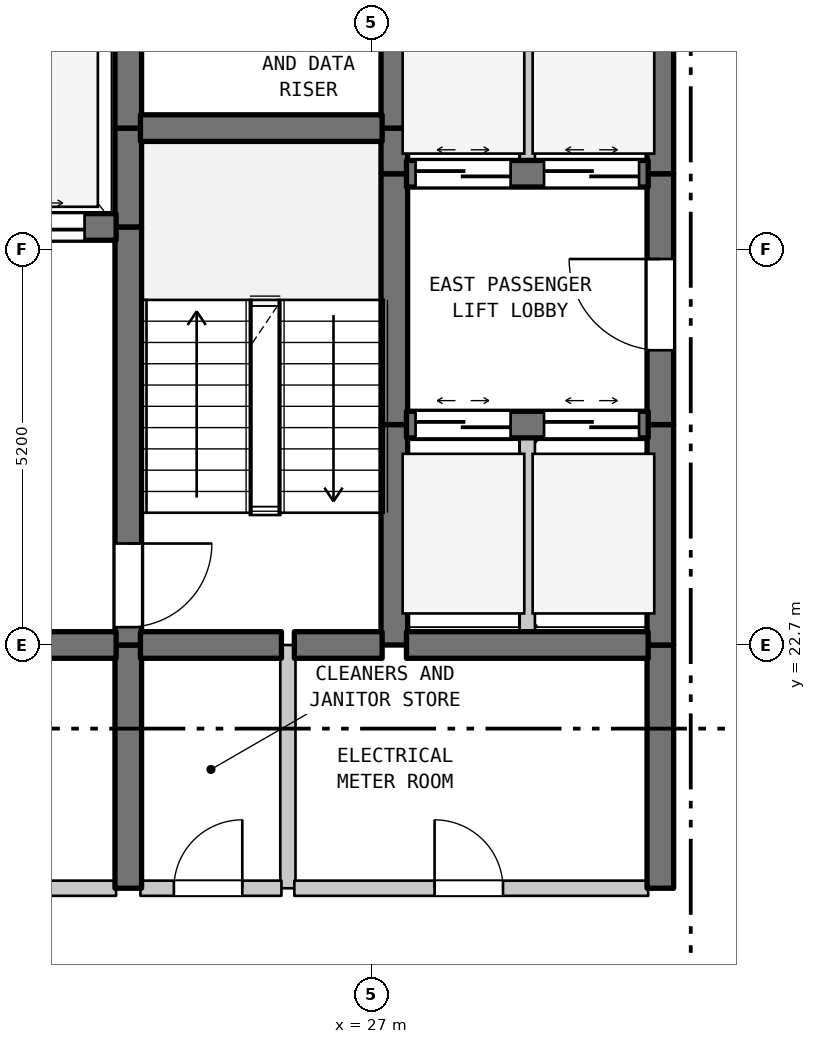
"""IFC4 building model, lengths in metres.
Left out: names, types, materials, properties, quantities, classifications, styles, units other than length and angle.
Written with IfcOpenShell. Run it as: python <this file> out.ifc"""

import sys

from ifc_helpers import new_model, si_unit, direction, frame, frame_2d, origin, place, context, subcontext, project, spatial, rectangle, extrude, element, fill, save


model = new_model("IFC4")
c1 = context("Model", 3, precision=1e-05, world=origin(), true_north=direction((0.0, 1.0)))
c2 = subcontext(c1, "Body", "Model", "MODEL_VIEW")
j1 = project(units=[si_unit("LENGTHUNIT", "METRE"), si_unit("PLANEANGLEUNIT", "RADIAN")], contexts=[c1])
p1 = place(None, origin())
s1 = spatial("IfcSite", under=j1, at=p1, CompositionType="ELEMENT")
p2 = place(p1, origin())
s2 = spatial("IfcBuilding", under=s1, at=p2, CompositionType="ELEMENT")
p3 = place(p2, frame((0.0, 0.0, 188.4)))
s3 = spatial("IfcBuildingStorey", under=s2, at=p3, CompositionType="ELEMENT", Elevation=188.4)
p4 = place(p3, frame((23.8, 19.5, 0.0), z_axis=(0.0, 0.0, 1.0), x_axis=(0.0, 1.0, 0.0)))
e1 = element("IfcWall", 1, at=p4, inside=s3, PredefinedType="SHEAR", context=c2, shape_type="SweptSolid", body=[
    extrude(rectangle(XDim=3.2, YDim=0.35, at=frame_2d((1.6, 0.0))), origin(), (0.0, 0.0, 1.0), 3.39),
])
p5 = place(p3, frame((23.8, 22.7, 0.0), z_axis=(0.0, 0.0, 1.0), x_axis=(0.0, 1.0, 0.0)))
e2 = element("IfcWall", 2, at=p5, inside=s3, PredefinedType="SHEAR", context=c2, shape_type="SweptSolid", body=[
    extrude(rectangle(XDim=5.5, YDim=0.35, at=frame_2d((2.75, 0.0))), origin(), (0.0, 0.0, 1.0), 3.39),
])
p6 = place(p5, frame((0.235, 0.0, 0.0)))
e3 = element("IfcOpeningElement", 3, at=p6, cuts=e2, PredefinedType="OPENING", context=c2, shape_type="SweptSolid", body=[
    extrude(rectangle(XDim=1.1, YDim=2.15, at=frame_2d((0.55, 1.075))), frame((0.0, 0.185, 0.0), z_axis=(0.0, -1.0, 0.0), x_axis=(1.0, 0.0, 0.0)), (0.0, 0.0, 1.0), 0.37),
])
for number, where, z_axis, x_axis in (
    (4, (23.8, 28.2, 0.0), (0.0, 0.0, 1.0), (0.0, 1.0, 0.0)),
    (5, (23.8, 29.5, 0.0), (0.0, 0.0, 1.0), (0.0, 1.0, 0.0)),
):
    element("IfcWall", number, at=place(p3, frame(where, z_axis=z_axis, x_axis=x_axis)), inside=s3, PredefinedType="SHEAR", context=c2, shape_type="SweptSolid", body=[
        extrude(rectangle(XDim=1.3, YDim=0.35, at=frame_2d((0.65, 0.0))), origin(), (0.0, 0.0, 1.0), 3.39),
    ])
p7 = place(p3, frame((25.9, 19.5, 0.0), z_axis=(0.0, 0.0, 1.0), x_axis=(0.0, 1.0, 0.0)))
e6 = element("IfcWall", 6, at=p7, inside=s3, PredefinedType="STANDARD", context=c2, shape_type="SweptSolid", body=[
    extrude(rectangle(XDim=3.2, YDim=0.2, at=frame_2d((1.6, 0.0))), origin(), (0.0, 0.0, 1.0), 3.39),
])
p8 = place(p3, frame((27.3, 22.7, 0.0), z_axis=(0.0, 0.0, 1.0), x_axis=(0.0, 1.0, 0.0)))
e7 = element("IfcWall", 7, at=p8, inside=s3, PredefinedType="SHEAR", context=c2, shape_type="SweptSolid", body=[
    extrude(rectangle(XDim=2.9, YDim=0.35, at=frame_2d((1.45, 0.0))), origin(), (0.0, 0.0, 1.0), 3.39),
])
p9 = place(p3, frame((27.3, 25.6, 0.0), z_axis=(0.0, 0.0, 1.0), x_axis=(0.0, 1.0, 0.0)))
e8 = element("IfcWall", 8, at=p9, inside=s3, PredefinedType="SHEAR", context=c2, shape_type="SweptSolid", body=[
    extrude(rectangle(XDim=3.3, YDim=0.35, at=frame_2d((1.65, 0.0))), origin(), (0.0, 0.0, 1.0), 3.39),
])
p10 = place(p3, frame((27.3, 28.9, 0.0), z_axis=(0.0, 0.0, 1.0), x_axis=(0.0, 1.0, 0.0)))
e9 = element("IfcWall", 9, at=p10, inside=s3, PredefinedType="SHEAR", context=c2, shape_type="SweptSolid", body=[
    extrude(rectangle(XDim=0.6, YDim=0.35, at=frame_2d((0.3, 0.0))), origin(), (0.0, 0.0, 1.0), 3.39),
])
p11 = place(p3, frame((27.3, 29.5, 0.0), z_axis=(0.0, 0.0, 1.0), x_axis=(0.0, 1.0, 0.0)))
e10 = element("IfcWall", 10, at=p11, inside=s3, PredefinedType="SHEAR", context=c2, shape_type="SweptSolid", body=[
    extrude(rectangle(XDim=2.0, YDim=0.35, at=frame_2d((1.0, 0.0))), origin(), (0.0, 0.0, 1.0), 3.39),
])
p12 = place(p3, frame((29.05, 22.7, 0.0), z_axis=(0.0, 0.0, 1.0), x_axis=(0.0, 1.0, 0.0)))
e11 = element("IfcWall", 11, at=p12, inside=s3, PredefinedType="STANDARD", context=c2, shape_type="SweptSolid", body=[
    extrude(rectangle(XDim=2.9, YDim=0.2, at=frame_2d((1.45, 0.0))), origin(), (0.0, 0.0, 1.0), 3.39),
])
p13 = place(p3, frame((29.05, 28.9, 0.0), z_axis=(0.0, 0.0, 1.0), x_axis=(0.0, 1.0, 0.0)))
e12 = element("IfcWall", 12, at=p13, inside=s3, PredefinedType="STANDARD", context=c2, shape_type="SweptSolid", body=[
    extrude(rectangle(XDim=2.6, YDim=0.2, at=frame_2d((1.3, 0.0))), origin(), (0.0, 0.0, 1.0), 3.39),
])
p14 = place(p3, frame((30.8, 19.5, 0.0), z_axis=(0.0, 0.0, 1.0), x_axis=(0.0, 1.0, 0.0)))
e13 = element("IfcWall", 13, at=p14, inside=s3, PredefinedType="SHEAR", context=c2, shape_type="SweptSolid", body=[
    extrude(rectangle(XDim=3.2, YDim=0.35, at=frame_2d((1.6, 0.0))), origin(), (0.0, 0.0, 1.0), 3.39),
])
p15 = place(p3, frame((30.8, 22.7, 0.0), z_axis=(0.0, 0.0, 1.0), x_axis=(0.0, 1.0, 0.0)))
e14 = element("IfcWall", 14, at=p15, inside=s3, PredefinedType="SHEAR", context=c2, shape_type="SweptSolid", body=[
    extrude(rectangle(XDim=2.9, YDim=0.35, at=frame_2d((1.45, 0.0))), origin(), (0.0, 0.0, 1.0), 3.39),
])
p16 = place(p3, frame((30.8, 25.6, 0.0), z_axis=(0.0, 0.0, 1.0), x_axis=(0.0, 1.0, 0.0)))
e15 = element("IfcWall", 15, at=p16, inside=s3, PredefinedType="SHEAR", context=c2, shape_type="SweptSolid", body=[
    extrude(rectangle(XDim=3.3, YDim=0.35, at=frame_2d((1.65, 0.0))), origin(), (0.0, 0.0, 1.0), 3.39),
])
p17 = place(p16, frame((0.978, 0.0, 0.0)))
e16 = element("IfcOpeningElement", 16, at=p17, cuts=e15, PredefinedType="OPENING", context=c2, shape_type="SweptSolid", body=[
    extrude(rectangle(XDim=1.2, YDim=2.2, at=frame_2d((0.6, 1.1))), frame((0.0, 0.185, 0.0), z_axis=(0.0, -1.0, 0.0), x_axis=(1.0, 0.0, 0.0)), (0.0, 0.0, 1.0), 0.37),
])
p18 = place(p3, frame((30.8, 28.9, 0.0), z_axis=(0.0, 0.0, 1.0), x_axis=(0.0, 1.0, 0.0)))
e17 = element("IfcWall", 17, at=p18, inside=s3, PredefinedType="SHEAR", context=c2, shape_type="SweptSolid", body=[
    extrude(rectangle(XDim=2.6, YDim=0.35, at=frame_2d((1.3, 0.0))), origin(), (0.0, 0.0, 1.0), 3.39),
])
p19 = place(p3, frame((19.16, 19.5, 0.0), z_axis=(0.0, 0.0, 1.0), x_axis=(1.0, 0.0, 0.0)))
e18 = element("IfcWall", 18, at=p19, inside=s3, PredefinedType="STANDARD", context=c2, shape_type="SweptSolid", body=[
    extrude(rectangle(XDim=4.48, YDim=0.2, at=frame_2d((2.24, 0.0))), origin(), (0.0, 0.0, 1.0), 3.39),
])
p20 = place(p19, frame((1.64, 0.0, 0.0)))
e19 = element("IfcOpeningElement", 19, at=p20, cuts=e18, PredefinedType="OPENING", context=c2, shape_type="SweptSolid", body=[
    extrude(rectangle(XDim=1.2, YDim=2.2, at=frame_2d((0.6, 1.1))), frame((0.0, 0.11, 0.0), z_axis=(0.0, -1.0, 0.0), x_axis=(1.0, 0.0, 0.0)), (0.0, 0.0, 1.0), 0.22),
])
p21 = place(p3, frame((23.96, 19.5, 0.0), z_axis=(0.0, 0.0, 1.0), x_axis=(1.0, 0.0, 0.0)))
e20 = element("IfcWall", 20, at=p21, inside=s3, PredefinedType="STANDARD", context=c2, shape_type="SweptSolid", body=[
    extrude(rectangle(XDim=1.855, YDim=0.2, at=frame_2d((0.927, 0.0))), origin(), (0.0, 0.0, 1.0), 3.39),
])
p22 = place(p21, frame((0.44, 0.0, 0.0)))
e21 = element("IfcOpeningElement", 21, at=p22, cuts=e20, PredefinedType="OPENING", context=c2, shape_type="SweptSolid", body=[
    extrude(rectangle(XDim=0.9, YDim=2.15, at=frame_2d((0.45, 1.075))), frame((0.0, 0.11, 0.0), z_axis=(0.0, -1.0, 0.0), x_axis=(1.0, 0.0, 0.0)), (0.0, 0.0, 1.0), 0.22),
])
p23 = place(p3, frame((25.985, 19.5, 0.0), z_axis=(0.0, 0.0, 1.0), x_axis=(1.0, 0.0, 0.0)))
e22 = element("IfcWall", 22, at=p23, inside=s3, PredefinedType="STANDARD", context=c2, shape_type="SweptSolid", body=[
    extrude(rectangle(XDim=4.655, YDim=0.2, at=frame_2d((2.327, 0.0))), origin(), (0.0, 0.0, 1.0), 3.39),
])
p24 = place(p23, frame((1.845, 0.0, 0.0)))
e23 = element("IfcOpeningElement", 23, at=p24, cuts=e22, PredefinedType="OPENING", context=c2, shape_type="SweptSolid", body=[
    extrude(rectangle(XDim=0.9, YDim=2.15, at=frame_2d((0.45, 1.075))), frame((0.0, 0.11, 0.0), z_axis=(0.0, -1.0, 0.0), x_axis=(1.0, 0.0, 0.0)), (0.0, 0.0, 1.0), 0.22),
])
p25 = place(p3, frame((19.16, 22.7, 0.0), z_axis=(0.0, 0.0, 1.0), x_axis=(1.0, 0.0, 0.0)))
e24 = element("IfcWall", 24, at=p25, inside=s3, PredefinedType="SHEAR", context=c2, shape_type="SweptSolid", body=[
    extrude(rectangle(XDim=4.48, YDim=0.35, at=frame_2d((2.24, 0.0))), origin(), (0.0, 0.0, 1.0), 3.39),
])
p26 = place(p25, frame((1.64, 0.0, 0.0)))
e25 = element("IfcOpeningElement", 25, at=p26, cuts=e24, PredefinedType="OPENING", context=c2, shape_type="SweptSolid", body=[
    extrude(rectangle(XDim=1.2, YDim=2.2, at=frame_2d((0.6, 1.1))), frame((0.0, 0.185, 0.0), z_axis=(0.0, -1.0, 0.0), x_axis=(1.0, 0.0, 0.0)), (0.0, 0.0, 1.0), 0.37),
])
p27 = place(p3, frame((23.96, 22.7, 0.0), z_axis=(0.0, 0.0, 1.0), x_axis=(1.0, 0.0, 0.0)))
e26 = element("IfcWall", 26, at=p27, inside=s3, PredefinedType="SHEAR", context=c2, shape_type="SweptSolid", body=[
    extrude(rectangle(XDim=1.855, YDim=0.35, at=frame_2d((0.927, 0.0))), origin(), (0.0, 0.0, 1.0), 3.39),
])
p28 = place(p3, frame((25.985, 22.7, 0.0), z_axis=(0.0, 0.0, 1.0), x_axis=(1.0, 0.0, 0.0)))
e27 = element("IfcWall", 27, at=p28, inside=s3, PredefinedType="SHEAR", context=c2, shape_type="SweptSolid", body=[
    extrude(rectangle(XDim=1.155, YDim=0.35, at=frame_2d((0.577, 0.0))), origin(), (0.0, 0.0, 1.0), 3.39),
])
p29 = place(p3, frame((27.46, 22.7, 0.0), z_axis=(0.0, 0.0, 1.0), x_axis=(1.0, 0.0, 0.0)))
e28 = element("IfcWall", 28, at=p29, inside=s3, PredefinedType="SHEAR", context=c2, shape_type="SweptSolid", body=[
    extrude(rectangle(XDim=3.18, YDim=0.35, at=frame_2d((1.59, 0.0))), origin(), (0.0, 0.0, 1.0), 3.39),
])
p30 = place(p3, frame((27.46, 25.6, 0.0), z_axis=(0.0, 0.0, 1.0), x_axis=(1.0, 0.0, 0.0)))
e29 = element("IfcWall", 29, at=p30, inside=s3, PredefinedType="SHEAR", context=c2, shape_type="SweptSolid", body=[
    extrude(rectangle(XDim=3.18, YDim=0.35, at=frame_2d((1.59, 0.0))), origin(), (0.0, 0.0, 1.0), 3.39),
])
p31 = place(p30, frame((0.12, 0.0, 0.0)))
e30 = element("IfcOpeningElement", 30, at=p31, cuts=e29, PredefinedType="OPENING", context=c2, shape_type="SweptSolid", body=[
    extrude(rectangle(XDim=1.25, YDim=2.2, at=frame_2d((0.625, 1.1))), frame((0.0, 0.185, 0.0), z_axis=(0.0, -1.0, 0.0), x_axis=(1.0, 0.0, 0.0)), (0.0, 0.0, 1.0), 0.37),
])
p32 = place(p30, frame((1.81, 0.0, 0.0)))
e31 = element("IfcOpeningElement", 31, at=p32, cuts=e29, PredefinedType="OPENING", context=c2, shape_type="SweptSolid", body=[
    extrude(rectangle(XDim=1.25, YDim=2.2, at=frame_2d((0.625, 1.1))), frame((0.0, 0.185, 0.0), z_axis=(0.0, -1.0, 0.0), x_axis=(1.0, 0.0, 0.0)), (0.0, 0.0, 1.0), 0.37),
])
p33 = place(p3, frame((19.16, 28.2, 0.0), z_axis=(0.0, 0.0, 1.0), x_axis=(1.0, 0.0, 0.0)))
e32 = element("IfcWall", 32, at=p33, inside=s3, PredefinedType="SHEAR", context=c2, shape_type="SweptSolid", body=[
    extrude(rectangle(XDim=4.48, YDim=0.35, at=frame_2d((2.24, 0.0))), origin(), (0.0, 0.0, 1.0), 3.39),
])
p34 = place(p33, frame((0.415, 0.0, 0.0)))
e33 = element("IfcOpeningElement", 33, at=p34, cuts=e32, PredefinedType="OPENING", context=c2, shape_type="SweptSolid", body=[
    extrude(rectangle(XDim=1.25, YDim=2.2, at=frame_2d((0.625, 1.1))), frame((0.0, 0.185, 0.0), z_axis=(0.0, -1.0, 0.0), x_axis=(1.0, 0.0, 0.0)), (0.0, 0.0, 1.0), 0.37),
])
p35 = place(p33, frame((2.815, 0.0, 0.0)))
e34 = element("IfcOpeningElement", 34, at=p35, cuts=e32, PredefinedType="OPENING", context=c2, shape_type="SweptSolid", body=[
    extrude(rectangle(XDim=1.25, YDim=2.2, at=frame_2d((0.625, 1.1))), frame((0.0, 0.185, 0.0), z_axis=(0.0, -1.0, 0.0), x_axis=(1.0, 0.0, 0.0)), (0.0, 0.0, 1.0), 0.37),
])
p36 = place(p3, frame((27.46, 28.9, 0.0), z_axis=(0.0, 0.0, 1.0), x_axis=(1.0, 0.0, 0.0)))
e35 = element("IfcWall", 35, at=p36, inside=s3, PredefinedType="SHEAR", context=c2, shape_type="SweptSolid", body=[
    extrude(rectangle(XDim=3.18, YDim=0.35, at=frame_2d((1.59, 0.0))), origin(), (0.0, 0.0, 1.0), 3.39),
])
p37 = place(p36, frame((0.12, 0.0, 0.0)))
e36 = element("IfcOpeningElement", 36, at=p37, cuts=e35, PredefinedType="OPENING", context=c2, shape_type="SweptSolid", body=[
    extrude(rectangle(XDim=1.25, YDim=2.2, at=frame_2d((0.625, 1.1))), frame((0.0, 0.185, 0.0), z_axis=(0.0, -1.0, 0.0), x_axis=(1.0, 0.0, 0.0)), (0.0, 0.0, 1.0), 0.37),
])
p38 = place(p36, frame((1.81, 0.0, 0.0)))
e37 = element("IfcOpeningElement", 37, at=p38, cuts=e35, PredefinedType="OPENING", context=c2, shape_type="SweptSolid", body=[
    extrude(rectangle(XDim=1.25, YDim=2.2, at=frame_2d((0.625, 1.1))), frame((0.0, 0.185, 0.0), z_axis=(0.0, -1.0, 0.0), x_axis=(1.0, 0.0, 0.0)), (0.0, 0.0, 1.0), 0.37),
])
p39 = place(p3, frame((23.96, 29.5, 0.0), z_axis=(0.0, 0.0, 1.0), x_axis=(1.0, 0.0, 0.0)))
e38 = element("IfcWall", 38, at=p39, inside=s3, PredefinedType="SHEAR", context=c2, shape_type="SweptSolid", body=[
    extrude(rectangle(XDim=3.18, YDim=0.35, at=frame_2d((1.59, 0.0))), origin(), (0.0, 0.0, 1.0), 3.39),
])
p40 = place(p6, frame((1.1, 0.0, 0.0), z_axis=(0.0, 0.0, 1.0), x_axis=(-1.0, 0.0, 0.0)))
e39 = element("IfcDoor", 39, at=p40, inside=s3, OperationType="SINGLE_SWING_RIGHT", PredefinedType="DOOR", context=c2, shape_type="SweptSolid", body=[
    extrude(rectangle(XDim=1.1, YDim=2.15, at=frame_2d((0.55, 1.075))), frame((0.0, 0.025, 0.0), z_axis=(0.0, -1.0, 0.0), x_axis=(1.0, 0.0, 0.0)), (0.0, 0.0, 1.0), 0.05),
])
fill(e3, e39)
p41 = place(p17, origin())
e40 = element("IfcDoor", 40, at=p41, inside=s3, OperationType="SINGLE_SWING_RIGHT", PredefinedType="DOOR", context=c2, shape_type="SweptSolid", body=[
    extrude(rectangle(XDim=1.2, YDim=2.2, at=frame_2d((0.6, 1.1))), frame((0.0, 0.025, 0.0), z_axis=(0.0, -1.0, 0.0), x_axis=(1.0, 0.0, 0.0)), (0.0, 0.0, 1.0), 0.05),
])
fill(e16, e40)
p42 = place(p22, origin())
e41 = element("IfcDoor", 41, at=p42, inside=s3, OperationType="SINGLE_SWING_RIGHT", PredefinedType="DOOR", context=c2, shape_type="SweptSolid", body=[
    extrude(rectangle(XDim=0.9, YDim=2.15, at=frame_2d((0.45, 1.075))), frame((0.0, 0.025, 0.0), z_axis=(0.0, -1.0, 0.0), x_axis=(1.0, 0.0, 0.0)), (0.0, 0.0, 1.0), 0.05),
])
fill(e21, e41)
p43 = place(p24, origin())
e42 = element("IfcDoor", 42, at=p43, inside=s3, OperationType="SINGLE_SWING_LEFT", PredefinedType="DOOR", context=c2, shape_type="SweptSolid", body=[
    extrude(rectangle(XDim=0.9, YDim=2.15, at=frame_2d((0.45, 1.075))), frame((0.0, 0.025, 0.0), z_axis=(0.0, -1.0, 0.0), x_axis=(1.0, 0.0, 0.0)), (0.0, 0.0, 1.0), 0.05),
])
fill(e23, e42)
p44 = place(p31, origin())
e43 = element("IfcDoor", 43, at=p44, inside=s3, OperationType="DOUBLE_DOOR_SLIDING", PredefinedType="DOOR", context=c2, shape_type="SweptSolid", body=[
    extrude(rectangle(XDim=1.25, YDim=2.2, at=frame_2d((0.625, 1.1))), frame((0.0, 0.025, 0.0), z_axis=(0.0, -1.0, 0.0), x_axis=(1.0, 0.0, 0.0)), (0.0, 0.0, 1.0), 0.05),
])
fill(e30, e43)
p45 = place(p32, origin())
e44 = element("IfcDoor", 44, at=p45, inside=s3, OperationType="DOUBLE_DOOR_SLIDING", PredefinedType="DOOR", context=c2, shape_type="SweptSolid", body=[
    extrude(rectangle(XDim=1.25, YDim=2.2, at=frame_2d((0.625, 1.1))), frame((0.0, 0.025, 0.0), z_axis=(0.0, -1.0, 0.0), x_axis=(1.0, 0.0, 0.0)), (0.0, 0.0, 1.0), 0.05),
])
fill(e31, e44)
p46 = place(p35, origin())
e45 = element("IfcDoor", 45, at=p46, inside=s3, OperationType="DOUBLE_DOOR_SLIDING", PredefinedType="DOOR", context=c2, shape_type="SweptSolid", body=[
    extrude(rectangle(XDim=1.25, YDim=2.2, at=frame_2d((0.625, 1.1))), frame((0.0, 0.025, 0.0), z_axis=(0.0, -1.0, 0.0), x_axis=(1.0, 0.0, 0.0)), (0.0, 0.0, 1.0), 0.05),
])
fill(e34, e45)
p47 = place(p37, origin())
e46 = element("IfcDoor", 46, at=p47, inside=s3, OperationType="DOUBLE_DOOR_SLIDING", PredefinedType="DOOR", context=c2, shape_type="SweptSolid", body=[
    extrude(rectangle(XDim=1.25, YDim=2.2, at=frame_2d((0.625, 1.1))), frame((0.0, 0.025, 0.0), z_axis=(0.0, -1.0, 0.0), x_axis=(1.0, 0.0, 0.0)), (0.0, 0.0, 1.0), 0.05),
])
fill(e36, e46)
p48 = place(p38, origin())
e47 = element("IfcDoor", 47, at=p48, inside=s3, OperationType="DOUBLE_DOOR_SLIDING", PredefinedType="DOOR", context=c2, shape_type="SweptSolid", body=[
    extrude(rectangle(XDim=1.25, YDim=2.2, at=frame_2d((0.625, 1.1))), frame((0.0, 0.025, 0.0), z_axis=(0.0, -1.0, 0.0), x_axis=(1.0, 0.0, 0.0)), (0.0, 0.0, 1.0), 0.05),
])
fill(e37, e47)
save(model, sys.argv[1])
